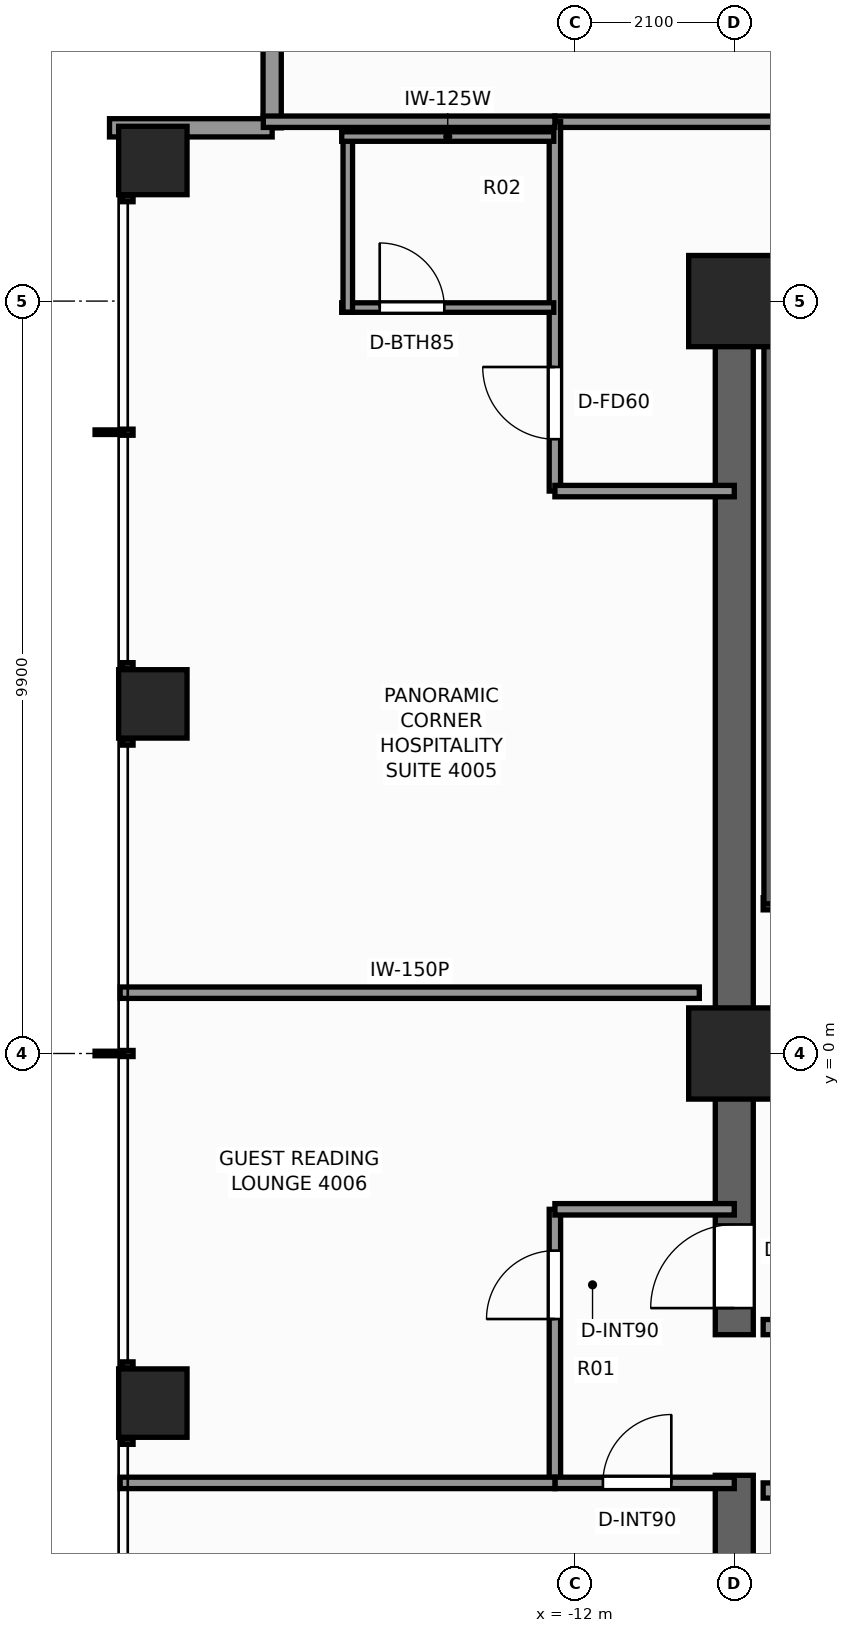
"""IFC4 building model, lengths in metres.
Left out: names, types, materials, properties, quantities, classifications, styles, units other than length and angle.
Written with IfcOpenShell. Run it as: python <this file> out.ifc"""

import sys

from ifc_helpers import new_model, si_unit, direction, frame, frame_2d, origin, origin_2d, place, context, subcontext, project, spatial, rectangle, extrude, element, fill, save


model = new_model("IFC4")
c1 = context("Model", 3, precision=1e-05, world=origin(), true_north=direction((0.0, 1.0)))
c2 = subcontext(c1, "Body", "Model", "MODEL_VIEW")
j1 = project(units=[si_unit("LENGTHUNIT", "METRE"), si_unit("PLANEANGLEUNIT", "RADIAN")], contexts=[c1])
p1 = place(None, origin())
s1 = spatial("IfcSite", under=j1, at=p1, CompositionType="ELEMENT")
p2 = place(p1, origin())
s2 = spatial("IfcBuilding", under=s1, at=p2, CompositionType="ELEMENT")
p3 = place(p2, frame((0.0, 0.0, 138.2)))
s3 = spatial("IfcBuildingStorey", under=s2, at=p3, CompositionType="ELEMENT", Elevation=138.2)
p4 = place(p3, frame((-10.15, 9.9, 0.0), z_axis=(0.0, 0.0, 1.0), x_axis=(1.0, 0.0, 0.0)))
e1 = element("IfcWall", 1, at=p4, inside=s3, PredefinedType="SHEAR", context=c2, shape_type="SweptSolid", body=[
    extrude(rectangle(XDim=14.57, YDim=0.5, at=frame_2d((7.285, 0.0))), origin(), (0.0, 0.0, 1.0), 3.3),
])
p5 = place(p3, frame((-9.9, -9.65, 0.0), z_axis=(0.0, 0.0, 1.0), x_axis=(0.0, 1.0, 0.0)))
e2 = element("IfcWall", 2, at=p5, inside=s3, PredefinedType="SHEAR", context=c2, shape_type="SweptSolid", body=[
    extrude(rectangle(XDim=4.1, YDim=0.5, at=frame_2d((2.05, 0.0))), origin(), (0.0, 0.0, 1.0), 3.3),
])
p6 = place(p3, frame((-9.9, -3.7, 0.0), z_axis=(0.0, 0.0, 1.0), x_axis=(0.0, 1.0, 0.0)))
e3 = element("IfcWall", 3, at=p6, inside=s3, PredefinedType="SHEAR", context=c2, shape_type="SweptSolid", body=[
    extrude(rectangle(XDim=13.35, YDim=0.5, at=frame_2d((6.675, 0.0))), origin(), (0.0, 0.0, 1.0), 3.3),
])
p7 = place(p6, frame((0.35, 0.0, 0.0)))
e4 = element("IfcOpeningElement", 4, at=p7, cuts=e3, PredefinedType="OPENING", context=c2, shape_type="SweptSolid", body=[
    extrude(rectangle(XDim=1.1, YDim=2.2, at=frame_2d((0.55, 1.1))), frame((0.0, 0.26, 0.0), z_axis=(0.0, -1.0, 0.0), x_axis=(1.0, 0.0, 0.0)), (0.0, 0.0, 1.0), 0.52),
])
for number, where, z_axis, x_axis in (
    (5, (-9.9, 9.9, 0.0), (0.0, 0.0, 1.0), (1.0, 0.0, 0.0)),
    (6, (-9.9, 0.0, 0.0), (0.0, 0.0, 1.0), (1.0, 0.0, 0.0)),
):
    element("IfcColumn", number, at=place(p3, frame(where, z_axis=z_axis, x_axis=x_axis)), inside=s3, PredefinedType="COLUMN", context=c2, shape_type="SweptSolid", body=[
        extrude(rectangle(XDim=1.2, YDim=1.2, at=origin_2d()), origin(), (0.0, 0.0, 1.0), 3.3),
    ])
for number, where, z_axis, x_axis in (
    (7, (-17.55, -4.6, 0.0), (0.0, 0.0, 1.0), (1.0, 0.0, 0.0)),
    (8, (-17.55, 4.6, 0.0), (0.0, 0.0, 1.0), (1.0, 0.0, 0.0)),
    (9, (-17.55, 11.75, 0.0), (0.0, 0.0, 1.0), (1.0, 0.0, 0.0)),
):
    element("IfcColumn", number, at=place(p3, frame(where, z_axis=z_axis, x_axis=x_axis)), inside=s3, PredefinedType="COLUMN", context=c2, shape_type="SweptSolid", body=[
        extrude(rectangle(XDim=0.9, YDim=0.9, at=origin_2d()), origin(), (0.0, 0.0, 1.0), 3.3),
    ])
for number, where, z_axis, x_axis in (
    (10, (-15.98, 12.18, 0.0), (0.0, 0.0, 1.0), (0.0, 1.0, 0.0)),
    (11, (-18.12, 12.18, 0.0), (0.0, 0.0, 1.0), (1.0, 0.0, 0.0)),
):
    element("IfcWall", number, at=place(p3, frame(where, z_axis=z_axis, x_axis=x_axis)), inside=s3, PredefinedType="STANDARD", context=c2, shape_type="SweptSolid", body=[
        extrude(rectangle(XDim=2.14, YDim=0.24, at=frame_2d((1.07, 0.0))), origin(), (0.0, 0.0, 1.0), 2.479),
    ])
p8 = place(p3, frame((-9.52, 1.97, 0.0), z_axis=(0.0, 0.0, 1.0), x_axis=(1.0, 0.0, 0.0)))
e12 = element("IfcWall", 12, at=p8, inside=s3, PredefinedType="SHEAR", context=c2, shape_type="SweptSolid", body=[
    extrude(rectangle(XDim=3.52, YDim=0.16, at=frame_2d((1.76, 0.0))), origin(), (0.0, 0.0, 1.0), 3.3),
])
p9 = place(p8, frame((1.15, 0.0, 0.0)))
e13 = element("IfcOpeningElement", 13, at=p9, cuts=e12, PredefinedType="OPENING", context=c2, shape_type="SweptSolid", body=[
    extrude(rectangle(XDim=1.1, YDim=2.2, at=frame_2d((0.55, 1.1))), frame((0.0, 0.09, 0.0), z_axis=(0.0, -1.0, 0.0), x_axis=(1.0, 0.0, 0.0)), (0.0, 0.0, 1.0), 0.18),
])
p10 = place(p3, frame((-9.52, 9.53, 0.0), z_axis=(0.0, 0.0, 1.0), x_axis=(1.0, 0.0, 0.0)))
e14 = element("IfcWall", 14, at=p10, inside=s3, PredefinedType="SHEAR", context=c2, shape_type="SweptSolid", body=[
    extrude(rectangle(XDim=3.52, YDim=0.16, at=frame_2d((1.76, 0.0))), origin(), (0.0, 0.0, 1.0), 3.3),
])
p11 = place(p3, frame((-9.43, 1.97, 0.0), z_axis=(0.0, 0.0, 1.0), x_axis=(0.0, 1.0, 0.0)))
e15 = element("IfcWall", 15, at=p11, inside=s3, PredefinedType="SHEAR", context=c2, shape_type="SweptSolid", body=[
    extrude(rectangle(XDim=7.56, YDim=0.16, at=frame_2d((3.78, 0.0))), origin(), (0.0, 0.0, 1.0), 3.3),
])
p12 = place(p3, frame((-9.52, -3.6, 0.0), z_axis=(0.0, 0.0, 1.0), x_axis=(1.0, 0.0, 0.0)))
e16 = element("IfcWall", 16, at=p12, inside=s3, PredefinedType="SOLIDWALL", context=c2, shape_type="SweptSolid", body=[
    extrude(rectangle(XDim=3.77, YDim=0.2, at=frame_2d((1.885, 0.0))), origin(), (0.0, 0.0, 1.0), 3.1),
])
p13 = place(p12, frame((1.15, 0.0, 0.0)))
e17 = element("IfcOpeningElement", 17, at=p13, cuts=e16, PredefinedType="OPENING", context=c2, shape_type="SweptSolid", body=[
    extrude(rectangle(XDim=0.95, YDim=2.06, at=frame_2d((0.475, 1.03))), frame((0.0, 0.11, 0.0), z_axis=(0.0, -1.0, 0.0), x_axis=(1.0, 0.0, 0.0)), (0.0, 0.0, 1.0), 0.22),
])
p14 = place(p3, frame((-9.52, -5.75, 0.0), z_axis=(0.0, 0.0, 1.0), x_axis=(1.0, 0.0, 0.0)))
e18 = element("IfcWall", 18, at=p14, inside=s3, PredefinedType="SOLIDWALL", context=c2, shape_type="SweptSolid", body=[
    extrude(rectangle(XDim=5.66, YDim=0.2, at=frame_2d((2.83, 0.0))), origin(), (0.0, 0.0, 1.0), 3.1),
])
p15 = place(p14, frame((0.55, 0.0, 0.0)))
e19 = element("IfcOpeningElement", 19, at=p15, cuts=e18, PredefinedType="OPENING", context=c2, shape_type="SweptSolid", body=[
    extrude(rectangle(XDim=1.1, YDim=2.2, at=frame_2d((0.55, 1.1))), frame((0.0, 0.11, 0.0), z_axis=(0.0, -1.0, 0.0), x_axis=(1.0, 0.0, 0.0)), (0.0, 0.0, 1.0), 0.22),
])
p16 = place(p14, frame((2.48, 0.0, 0.0)))
e20 = element("IfcOpeningElement", 20, at=p16, cuts=e18, PredefinedType="OPENING", context=c2, shape_type="SweptSolid", body=[
    extrude(rectangle(XDim=1.1, YDim=2.2, at=frame_2d((0.55, 1.1))), frame((0.0, 0.11, 0.0), z_axis=(0.0, -1.0, 0.0), x_axis=(1.0, 0.0, 0.0)), (0.0, 0.0, 1.0), 0.22),
])
p17 = place(p14, frame((4.41, 0.0, 0.0)))
e21 = element("IfcOpeningElement", 21, at=p17, cuts=e18, PredefinedType="OPENING", context=c2, shape_type="SweptSolid", body=[
    extrude(rectangle(XDim=1.1, YDim=2.2, at=frame_2d((0.55, 1.1))), frame((0.0, 0.11, 0.0), z_axis=(0.0, -1.0, 0.0), x_axis=(1.0, 0.0, 0.0)), (0.0, 0.0, 1.0), 0.22),
])
p18 = place(p3, frame((-12.26, 12.26, 0.0), z_axis=(0.0, 0.0, 1.0), x_axis=(1.0, 0.0, 0.0)))
e22 = element("IfcWall", 22, at=p18, inside=s3, PredefinedType="PARTITIONING", context=c2, shape_type="SweptSolid", body=[
    extrude(rectangle(XDim=24.68, YDim=0.15, at=frame_2d((12.34, 0.0))), origin(), (0.0, 0.0, 1.0), 2.312),
])
p19 = place(p18, frame((4.275, 0.0, 0.0)))
e23 = element("IfcOpeningElement", 23, at=p19, cuts=e22, PredefinedType="OPENING", context=c2, shape_type="SweptSolid", body=[
    extrude(rectangle(XDim=0.9, YDim=2.06, at=frame_2d((0.45, 1.03))), frame((0.0, 0.085, 0.0), z_axis=(0.0, -1.0, 0.0), x_axis=(1.0, 0.0, 0.0)), (0.0, 0.0, 1.0), 0.17),
])
p20 = place(p18, frame((19.345, 0.0, 0.0)))
e24 = element("IfcOpeningElement", 24, at=p20, cuts=e22, PredefinedType="OPENING", context=c2, shape_type="SweptSolid", body=[
    extrude(rectangle(XDim=0.9, YDim=2.06, at=frame_2d((0.45, 1.03))), frame((0.0, 0.085, 0.0), z_axis=(0.0, -1.0, 0.0), x_axis=(1.0, 0.0, 0.0)), (0.0, 0.0, 1.0), 0.17),
])
p21 = place(p3, frame((-12.26, 7.4, 0.0), z_axis=(0.0, 0.0, 1.0), x_axis=(0.0, 1.0, 0.0)))
e25 = element("IfcWall", 25, at=p21, inside=s3, PredefinedType="PARTITIONING", context=c2, shape_type="SweptSolid", body=[
    extrude(rectangle(XDim=4.86, YDim=0.15, at=frame_2d((2.43, 0.0))), origin(), (0.0, 0.0, 1.0), 2.312),
])
p22 = place(p21, frame((0.683, 0.0, 0.0)))
e26 = element("IfcOpeningElement", 26, at=p22, cuts=e25, PredefinedType="OPENING", context=c2, shape_type="SweptSolid", body=[
    extrude(rectangle(XDim=0.95, YDim=2.06, at=frame_2d((0.475, 1.03))), frame((0.0, 0.085, 0.0), z_axis=(0.0, -1.0, 0.0), x_axis=(1.0, 0.0, 0.0)), (0.0, 0.0, 1.0), 0.17),
])
p23 = place(p3, frame((-12.26, 7.4, 0.0), z_axis=(0.0, 0.0, 1.0), x_axis=(1.0, 0.0, 0.0)))
e27 = element("IfcWall", 27, at=p23, inside=s3, PredefinedType="PARTITIONING", context=c2, shape_type="SweptSolid", body=[
    extrude(rectangle(XDim=2.36, YDim=0.15, at=frame_2d((1.18, 0.0))), origin(), (0.0, 0.0, 1.0), 3.1),
])
p24 = place(p3, frame((-12.26, -5.65, 0.0), z_axis=(0.0, 0.0, 1.0), x_axis=(0.0, 1.0, 0.0)))
e28 = element("IfcWall", 28, at=p24, inside=s3, PredefinedType="PARTITIONING", context=c2, shape_type="SweptSolid", body=[
    extrude(rectangle(XDim=3.6, YDim=0.15, at=frame_2d((1.8, 0.0))), origin(), (0.0, 0.0, 1.0), 2.312),
])
p25 = place(p24, frame((2.156, 0.0, 0.0)))
e29 = element("IfcOpeningElement", 29, at=p25, cuts=e28, PredefinedType="OPENING", context=c2, shape_type="SweptSolid", body=[
    extrude(rectangle(XDim=0.9, YDim=2.06, at=frame_2d((0.45, 1.03))), frame((0.0, 0.085, 0.0), z_axis=(0.0, -1.0, 0.0), x_axis=(1.0, 0.0, 0.0)), (0.0, 0.0, 1.0), 0.17),
])
p26 = place(p3, frame((-12.26, -2.05, 0.0), z_axis=(0.0, 0.0, 1.0), x_axis=(1.0, 0.0, 0.0)))
e30 = element("IfcWall", 30, at=p26, inside=s3, PredefinedType="PARTITIONING", context=c2, shape_type="SweptSolid", body=[
    extrude(rectangle(XDim=2.36, YDim=0.15, at=frame_2d((1.18, 0.0))), origin(), (0.0, 0.0, 1.0), 2.389),
])
p27 = place(p3, frame((-12.26, -5.65, 0.0), z_axis=(0.0, 0.0, 1.0), x_axis=(1.0, 0.0, 0.0)))
e31 = element("IfcWall", 31, at=p27, inside=s3, PredefinedType="PARTITIONING", context=c2, shape_type="SweptSolid", body=[
    extrude(rectangle(XDim=2.36, YDim=0.15, at=frame_2d((1.18, 0.0))), origin(), (0.0, 0.0, 1.0), 3.1),
])
p28 = place(p27, frame((0.632, 0.0, 0.0)))
e32 = element("IfcOpeningElement", 32, at=p28, cuts=e31, PredefinedType="OPENING", context=c2, shape_type="SweptSolid", body=[
    extrude(rectangle(XDim=0.9, YDim=2.06, at=frame_2d((0.45, 1.03))), frame((0.0, 0.085, 0.0), z_axis=(0.0, -1.0, 0.0), x_axis=(1.0, 0.0, 0.0)), (0.0, 0.0, 1.0), 0.17),
])
p29 = place(p3, frame((-16.096, 12.26, 0.0), z_axis=(0.0, 0.0, 1.0), x_axis=(1.0, 0.0, 0.0)))
e33 = element("IfcWall", 33, at=p29, inside=s3, PredefinedType="PARTITIONING", context=c2, shape_type="SweptSolid", body=[
    extrude(rectangle(XDim=3.836, YDim=0.15, at=frame_2d((1.918, 0.0))), origin(), (0.0, 0.0, 1.0), 3.1),
])
p30 = place(p3, frame((-17.98, 0.8, 0.0), z_axis=(0.0, 0.0, 1.0), x_axis=(1.0, 0.0, 0.0)))
e34 = element("IfcWall", 34, at=p30, inside=s3, PredefinedType="PARTITIONING", context=c2, shape_type="SweptSolid", body=[
    extrude(rectangle(XDim=7.62, YDim=0.15, at=frame_2d((3.81, 0.0))), origin(), (0.0, 0.0, 1.0), 2.469),
])
p31 = place(p3, frame((-17.98, -5.65, 0.0), z_axis=(0.0, 0.0, 1.0), x_axis=(1.0, 0.0, 0.0)))
e35 = element("IfcWall", 35, at=p31, inside=s3, PredefinedType="PARTITIONING", context=c2, shape_type="SweptSolid", body=[
    extrude(rectangle(XDim=5.72, YDim=0.15, at=frame_2d((2.86, 0.0))), origin(), (0.0, 0.0, 1.0), 2.469),
])
p32 = place(p3, frame((-15.065, 9.815, 0.0), z_axis=(0.0, 0.0, 1.0), x_axis=(1.0, 0.0, 0.0)))
e36 = element("IfcWall", 36, at=p32, inside=s3, PredefinedType="PARTITIONING", context=c2, shape_type="SweptSolid", body=[
    extrude(rectangle(XDim=2.79, YDim=0.125, at=frame_2d((1.395, 0.0))), origin(), (0.0, 0.0, 1.0), 3.1),
])
p33 = place(p32, frame((0.5, 0.0, 0.0)))
e37 = element("IfcOpeningElement", 37, at=p33, cuts=e36, PredefinedType="OPENING", context=c2, shape_type="SweptSolid", body=[
    extrude(rectangle(XDim=0.85, YDim=2.03, at=frame_2d((0.425, 1.015))), frame((0.0, 0.073, 0.0), z_axis=(0.0, -1.0, 0.0), x_axis=(1.0, 0.0, 0.0)), (0.0, 0.0, 1.0), 0.145),
])
p34 = place(p3, frame((-14.985, 9.755, 0.0), z_axis=(0.0, 0.0, 1.0), x_axis=(0.0, 1.0, 0.0)))
e38 = element("IfcWall", 38, at=p34, inside=s3, PredefinedType="PARTITIONING", context=c2, shape_type="SweptSolid", body=[
    extrude(rectangle(XDim=2.37, YDim=0.125, at=frame_2d((1.185, 0.0))), origin(), (0.0, 0.0, 1.0), 2.312),
])
p35 = place(p3, frame((-15.065, 12.065, 0.0), z_axis=(0.0, 0.0, 1.0), x_axis=(1.0, 0.0, 0.0)))
e39 = element("IfcWall", 39, at=p35, inside=s3, PredefinedType="PARTITIONING", context=c2, shape_type="SweptSolid", body=[
    extrude(rectangle(XDim=2.79, YDim=0.125, at=frame_2d((1.395, 0.0))), origin(), (0.0, 0.0, 1.0), 3.1),
])
p36 = place(p7, origin())
e40 = element("IfcDoor", 40, at=p36, inside=s3, OperationType="SINGLE_SWING_LEFT", PredefinedType="DOOR", context=c2, shape_type="SweptSolid", body=[
    extrude(rectangle(XDim=1.1, YDim=2.2, at=frame_2d((0.55, 1.1))), frame((0.0, 0.025, 0.0), z_axis=(0.0, -1.0, 0.0), x_axis=(1.0, 0.0, 0.0)), (0.0, 0.0, 1.0), 0.05),
])
fill(e4, e40)
p37 = place(p33, origin())
e41 = element("IfcDoor", 41, at=p37, inside=s3, OperationType="SINGLE_SWING_LEFT", PredefinedType="DOOR", context=c2, shape_type="SweptSolid", body=[
    extrude(rectangle(XDim=0.85, YDim=2.03, at=frame_2d((0.425, 1.015))), frame((0.0, 0.025, 0.0), z_axis=(0.0, -1.0, 0.0), x_axis=(1.0, 0.0, 0.0)), (0.0, 0.0, 1.0), 0.05),
])
fill(e37, e41)
p38 = place(p22, origin())
e42 = element("IfcDoor", 42, at=p38, inside=s3, OperationType="SINGLE_SWING_RIGHT", PredefinedType="DOOR", context=c2, shape_type="SweptSolid", body=[
    extrude(rectangle(XDim=0.95, YDim=2.06, at=frame_2d((0.475, 1.03))), frame((0.0, 0.025, 0.0), z_axis=(0.0, -1.0, 0.0), x_axis=(1.0, 0.0, 0.0)), (0.0, 0.0, 1.0), 0.05),
])
fill(e26, e42)
p39 = place(p25, origin())
e43 = element("IfcDoor", 43, at=p39, inside=s3, OperationType="SINGLE_SWING_LEFT", PredefinedType="DOOR", context=c2, shape_type="SweptSolid", body=[
    extrude(rectangle(XDim=0.9, YDim=2.06, at=frame_2d((0.45, 1.03))), frame((0.0, 0.025, 0.0), z_axis=(0.0, -1.0, 0.0), x_axis=(1.0, 0.0, 0.0)), (0.0, 0.0, 1.0), 0.05),
])
fill(e29, e43)
p40 = place(p28, origin())
e44 = element("IfcDoor", 44, at=p40, inside=s3, OperationType="SINGLE_SWING_RIGHT", PredefinedType="DOOR", context=c2, shape_type="SweptSolid", body=[
    extrude(rectangle(XDim=0.9, YDim=2.06, at=frame_2d((0.45, 1.03))), frame((0.0, 0.025, 0.0), z_axis=(0.0, -1.0, 0.0), x_axis=(1.0, 0.0, 0.0)), (0.0, 0.0, 1.0), 0.05),
])
fill(e32, e44)
save(model, sys.argv[1])
